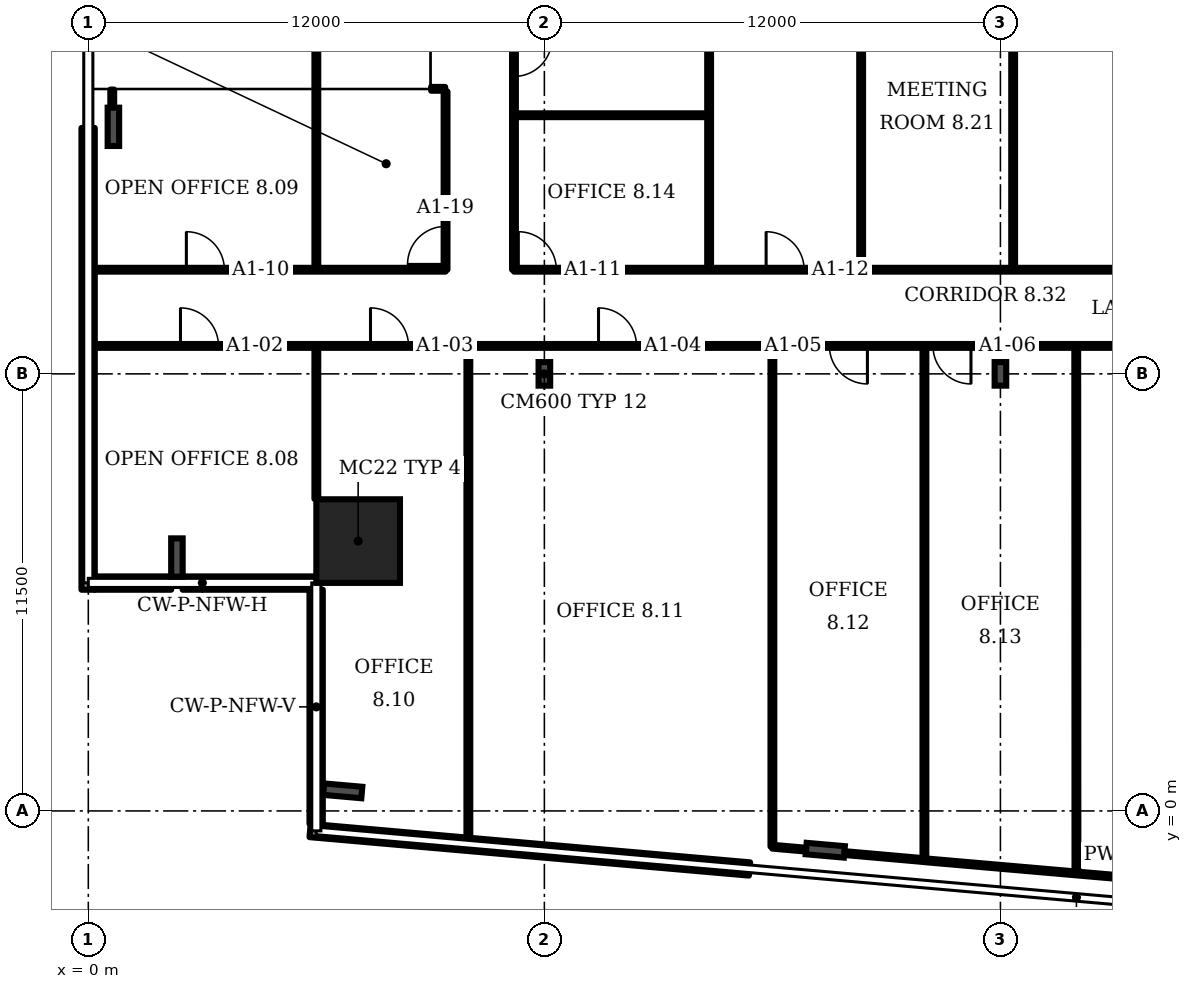
"""IFC4 building model, lengths in metres.
Left out: names, types, materials, properties, quantities, classifications, styles, units other than length and angle.
Written with IfcOpenShell. Run it as: python <this file> out.ifc"""

import sys

from ifc_helpers import new_model, si_unit, direction, frame, frame_2d, origin, origin_2d, place, context, subcontext, project, spatial, rectangle, i_section, extrude, element, fill, save


model = new_model("IFC4")
c1 = context("Model", 3, precision=1e-05, world=origin(), true_north=direction((0.0, 1.0)))
c2 = subcontext(c1, "Body", "Model", "MODEL_VIEW")
j1 = project(units=[si_unit("LENGTHUNIT", "METRE"), si_unit("PLANEANGLEUNIT", "RADIAN")], contexts=[c1])
p1 = place(None, origin())
s1 = spatial("IfcSite", under=j1, at=p1, CompositionType="ELEMENT")
p2 = place(p1, origin())
s2 = spatial("IfcBuilding", under=s1, at=p2, CompositionType="ELEMENT")
p3 = place(p2, frame((0.0, 0.0, 48.7)))
s3 = spatial("IfcBuildingStorey", under=s2, at=p3, CompositionType="ELEMENT", Elevation=48.7)
p4 = place(p3, frame((7.1, 7.1, 0.0), z_axis=(0.0, 0.0, 1.0), x_axis=(1.0, 0.0, 0.0)))
e1 = element("IfcColumn", 1, at=p4, inside=s3, PredefinedType="COLUMN", context=c2, shape_type="SweptSolid", body=[
    extrude(rectangle(XDim=2.2, YDim=2.2, at=origin_2d()), origin(), (0.0, 0.0, 1.0), 3.6),
])
for number, where, z_axis, x_axis in (
    (2, (6.694, 0.529, 0.0), (0.0, 0.0, 1.0), (-0.087, -0.996, 0.0)),
    (3, (19.391, -1.034, 0.0), (0.0, 0.0, 1.0), (-0.087, -0.996, 0.0)),
    (4, (0.66, 18.0, 0.0), (0.0, 0.0, 1.0), (-1.0, 0.0, 0.0)),
    (5, (2.332, 6.667, 0.0), (0.0, 0.0, 1.0), (-1.0, 0.0, 0.0)),
):
    element("IfcColumn", number, at=place(p3, frame(where, z_axis=z_axis, x_axis=x_axis)), inside=s3, PredefinedType="COLUMN", context=c2, shape_type="SweptSolid", body=[
        extrude(i_section(OverallWidth=0.302, OverallDepth=1.008, WebThickness=0.021, FlangeThickness=0.04, FilletRadius=0.03, at=origin_2d()), origin(), (0.0, 0.0, 1.0), 3.6),
    ])
for number, where, z_axis, x_axis in (
    (6, (12.0, 11.5, 0.0), (0.0, 0.0, 1.0), (1.0, 0.0, 0.0)),
    (7, (24.0, 11.5, 0.0), (0.0, 0.0, 1.0), (1.0, 0.0, 0.0)),
):
    element("IfcColumn", number, at=place(p3, frame(where, z_axis=z_axis, x_axis=x_axis)), inside=s3, PredefinedType="COLUMN", context=c2, shape_type="SweptSolid", body=[
        extrude(i_section(OverallWidth=0.305, OverallDepth=0.62, WebThickness=0.021, FlangeThickness=0.04, FilletRadius=0.027, at=origin_2d()), origin(), (0.0, 0.0, 1.0), 3.6),
    ])
p5 = place(p3, frame((5.835, -0.516, 0.0), z_axis=(0.0, 0.0, 1.0), x_axis=(0.996192, -0.087142, 0.0)))
e8 = element("IfcWall", 8, at=p5, inside=s3, PredefinedType="SOLIDWALL", context=c2, shape_type="SweptSolid", body=[
    extrude(rectangle(XDim=11.607, YDim=0.35, at=frame_2d((5.804, 0.0))), origin(), (0.0, 0.0, 1.0), 1.0),
])
p6 = place(p3, frame((-0.005, 17.97, 0.0), z_axis=(0.0, 0.0, 1.0), x_axis=(0.0, -1.0, 0.0)))
e9 = element("IfcWall", 9, at=p6, inside=s3, PredefinedType="SOLIDWALL", context=c2, shape_type="SweptSolid", body=[
    extrude(rectangle(XDim=12.15, YDim=0.35, at=frame_2d((6.075, 0.0))), origin(), (0.0, 0.0, 1.0), 1.0),
])
p7 = place(p3, frame((0.17, 5.995, 0.0), z_axis=(0.0, 0.0, 1.0), x_axis=(1.0, 0.0, 0.0)))
e10 = element("IfcWall", 10, at=p7, inside=s3, PredefinedType="SOLIDWALL", context=c2, shape_type="SweptSolid", body=[
    extrude(rectangle(XDim=2.011, YDim=0.35, at=frame_2d((1.005, 0.0))), origin(), (0.0, 0.0, 1.0), 1.0),
])
p8 = place(p3, frame((2.483, 5.995, 0.0), z_axis=(0.0, 0.0, 1.0), x_axis=(1.0, 0.0, 0.0)))
e11 = element("IfcWall", 11, at=p8, inside=s3, PredefinedType="SOLIDWALL", context=c2, shape_type="SweptSolid", body=[
    extrude(rectangle(XDim=3.517, YDim=0.35, at=frame_2d((1.759, 0.0))), origin(), (0.0, 0.0, 1.0), 1.0),
])
p9 = place(p3, frame((5.995, 5.82, 0.0), z_axis=(0.0, 0.0, 1.0), x_axis=(0.0, -1.0, 0.0)))
e12 = element("IfcWall", 12, at=p9, inside=s3, PredefinedType="SOLIDWALL", context=c2, shape_type="SweptSolid", body=[
    extrude(rectangle(XDim=6.161, YDim=0.35, at=frame_2d((3.081, 0.0))), origin(), (0.0, 0.0, 1.0), 1.0),
])
p10 = place(p3, frame((0.02, 12.235, 0.0), z_axis=(0.0, 0.0, 1.0), x_axis=(1.0, 0.0, 0.0)))
e13 = element("IfcWall", 13, at=p10, inside=s3, PredefinedType="PARTITIONING", context=c2, shape_type="SweptSolid", body=[
    extrude(rectangle(XDim=38.46, YDim=0.1, at=frame_2d((19.23, 0.0))), origin(), (0.0, 0.0, 1.0), 3.2),
])
p11 = place(p10, frame((2.405, 0.0, 0.0)))
e14 = element("IfcOpeningElement", 14, at=p11, cuts=e13, PredefinedType="OPENING", context=c2, shape_type="SweptSolid", body=[
    extrude(rectangle(XDim=1.0, YDim=2.1, at=frame_2d((0.5, 1.05))), frame((0.0, 0.06, 0.0), z_axis=(0.0, -1.0, 0.0), x_axis=(1.0, 0.0, 0.0)), (0.0, 0.0, 1.0), 0.12),
])
p12 = place(p10, frame((7.405, 0.0, 0.0)))
e15 = element("IfcOpeningElement", 15, at=p12, cuts=e13, PredefinedType="OPENING", context=c2, shape_type="SweptSolid", body=[
    extrude(rectangle(XDim=1.0, YDim=2.1, at=frame_2d((0.5, 1.05))), frame((0.0, 0.06, 0.0), z_axis=(0.0, -1.0, 0.0), x_axis=(1.0, 0.0, 0.0)), (0.0, 0.0, 1.0), 0.12),
])
p13 = place(p10, frame((13.405, 0.0, 0.0)))
e16 = element("IfcOpeningElement", 16, at=p13, cuts=e13, PredefinedType="OPENING", context=c2, shape_type="SweptSolid", body=[
    extrude(rectangle(XDim=1.0, YDim=2.1, at=frame_2d((0.5, 1.05))), frame((0.0, 0.06, 0.0), z_axis=(0.0, -1.0, 0.0), x_axis=(1.0, 0.0, 0.0)), (0.0, 0.0, 1.0), 0.12),
])
p14 = place(p10, frame((19.48, 0.0, 0.0)))
e17 = element("IfcOpeningElement", 17, at=p14, cuts=e13, PredefinedType="OPENING", context=c2, shape_type="SweptSolid", body=[
    extrude(rectangle(XDim=1.0, YDim=2.1, at=frame_2d((0.5, 1.05))), frame((0.0, 0.06, 0.0), z_axis=(0.0, -1.0, 0.0), x_axis=(1.0, 0.0, 0.0)), (0.0, 0.0, 1.0), 0.12),
])
p15 = place(p10, frame((22.205, 0.0, 0.0)))
e18 = element("IfcOpeningElement", 18, at=p15, cuts=e13, PredefinedType="OPENING", context=c2, shape_type="SweptSolid", body=[
    extrude(rectangle(XDim=1.0, YDim=2.1, at=frame_2d((0.5, 1.05))), frame((0.0, 0.06, 0.0), z_axis=(0.0, -1.0, 0.0), x_axis=(1.0, 0.0, 0.0)), (0.0, 0.0, 1.0), 0.12),
])
p16 = place(p10, frame((34.2, 0.0, 0.0)))
e19 = element("IfcOpeningElement", 19, at=p16, cuts=e13, PredefinedType="OPENING", context=c2, shape_type="SweptSolid", body=[
    extrude(rectangle(XDim=1.0, YDim=2.1, at=frame_2d((0.5, 1.05))), frame((0.0, 0.06, 0.0), z_axis=(0.0, -1.0, 0.0), x_axis=(1.0, 0.0, 0.0)), (0.0, 0.0, 1.0), 0.12),
])
p17 = place(p3, frame((0.02, 14.24, 0.0), z_axis=(0.0, 0.0, 1.0), x_axis=(1.0, 0.0, 0.0)))
e20 = element("IfcWall", 20, at=p17, inside=s3, PredefinedType="PARTITIONING", context=c2, shape_type="SweptSolid", body=[
    extrude(rectangle(XDim=9.38, YDim=0.1, at=frame_2d((4.69, 0.0))), origin(), (0.0, 0.0, 1.0), 3.2),
])
p18 = place(p17, frame((2.56, 0.0, 0.0)))
e21 = element("IfcOpeningElement", 21, at=p18, cuts=e20, PredefinedType="OPENING", context=c2, shape_type="SweptSolid", body=[
    extrude(rectangle(XDim=1.0, YDim=2.1, at=frame_2d((0.5, 1.05))), frame((0.0, 0.06, 0.0), z_axis=(0.0, -1.0, 0.0), x_axis=(1.0, 0.0, 0.0)), (0.0, 0.0, 1.0), 0.12),
])
p19 = place(p3, frame((0.63, 17.5, 0.0), z_axis=(0.0, 0.0, 1.0), x_axis=(0.0, 1.0, 0.0)))
e22 = element("IfcWall", 22, at=p19, inside=s3, PredefinedType="PARTITIONING", context=c2, shape_type="SweptSolid", body=[
    extrude(rectangle(XDim=1.48, YDim=0.1, at=frame_2d((0.74, 0.0))), origin(), (0.0, 0.0, 1.0), 2.58),
])
p20 = place(p3, frame((6.0, 8.21, 0.0), z_axis=(0.0, 0.0, 1.0), x_axis=(0.0, 1.0, 0.0)))
e23 = element("IfcWall", 23, at=p20, inside=s3, PredefinedType="PARTITIONING", context=c2, shape_type="SweptSolid", body=[
    extrude(rectangle(XDim=4.025, YDim=0.1, at=frame_2d((2.013, 0.0))), origin(), (0.0, 0.0, 1.0), 3.2),
])
p21 = place(p3, frame((6.0, 14.24, 0.0), z_axis=(0.0, 0.0, 1.0), x_axis=(0.0, 1.0, 0.0)))
e24 = element("IfcWall", 24, at=p21, inside=s3, PredefinedType="PARTITIONING", context=c2, shape_type="SweptSolid", body=[
    extrude(rectangle(XDim=6.085, YDim=0.1, at=frame_2d((3.042, 0.0))), origin(), (0.0, 0.0, 1.0), 3.2),
])
p22 = place(p3, frame((9.02, 19.0, 0.0), z_axis=(0.0, 0.0, 1.0), x_axis=(1.0, 0.0, 0.0)))
e25 = element("IfcWall", 25, at=p22, inside=s3, PredefinedType="PARTITIONING", context=c2, shape_type="SweptSolid", body=[
    extrude(rectangle(XDim=0.37, YDim=0.1, at=frame_2d((0.185, 0.0))), origin(), (0.0, 0.0, 1.0), 3.2),
])
p23 = place(p3, frame((9.4, 14.24, 0.0), z_axis=(0.0, 0.0, 1.0), x_axis=(0.0, 1.0, 0.0)))
e26 = element("IfcWall", 26, at=p23, inside=s3, PredefinedType="PARTITIONING", context=c2, shape_type="SweptSolid", body=[
    extrude(rectangle(XDim=4.69, YDim=0.1, at=frame_2d((2.345, 0.0))), origin(), (0.0, 0.0, 1.0), 3.2),
])
p24 = place(p23, frame((0.14, 0.0, 0.0)))
e27 = element("IfcOpeningElement", 27, at=p24, cuts=e26, PredefinedType="OPENING", context=c2, shape_type="SweptSolid", body=[
    extrude(rectangle(XDim=1.0, YDim=2.1, at=frame_2d((0.5, 1.05))), frame((0.0, 0.06, 0.0), z_axis=(0.0, -1.0, 0.0), x_axis=(1.0, 0.0, 0.0)), (0.0, 0.0, 1.0), 0.12),
])
p25 = place(p3, frame((10.0, -0.855, 0.0), z_axis=(0.0, 0.0, 1.0), x_axis=(0.0, 1.0, 0.0)))
e28 = element("IfcWall", 28, at=p25, inside=s3, PredefinedType="PARTITIONING", context=c2, shape_type="SweptSolid", body=[
    extrude(rectangle(XDim=13.09, YDim=0.1, at=frame_2d((6.545, 0.0))), origin(), (0.0, 0.0, 1.0), 3.2),
])
p26 = place(p3, frame((11.2, 14.24, 0.0), z_axis=(0.0, 0.0, 1.0), x_axis=(0.0, 1.0, 0.0)))
e29 = element("IfcWall", 29, at=p26, inside=s3, PredefinedType="PARTITIONING", context=c2, shape_type="SweptSolid", body=[
    extrude(rectangle(XDim=7.11, YDim=0.1, at=frame_2d((3.555, 0.0))), origin(), (0.0, 0.0, 1.0), 3.2),
])
p27 = place(p26, frame((5.085, 0.0, 0.0)))
e30 = element("IfcOpeningElement", 30, at=p27, cuts=e29, PredefinedType="OPENING", context=c2, shape_type="SweptSolid", body=[
    extrude(rectangle(XDim=1.0, YDim=2.1, at=frame_2d((0.5, 1.05))), frame((0.0, 0.06, 0.0), z_axis=(0.0, -1.0, 0.0), x_axis=(1.0, 0.0, 0.0)), (0.0, 0.0, 1.0), 0.12),
])
p28 = place(p3, frame((11.2, 14.24, 0.0), z_axis=(0.0, 0.0, 1.0), x_axis=(1.0, 0.0, 0.0)))
e31 = element("IfcWall", 31, at=p28, inside=s3, PredefinedType="PARTITIONING", context=c2, shape_type="SweptSolid", body=[
    extrude(rectangle(XDim=51.635, YDim=0.1, at=frame_2d((25.817, 0.0))), origin(), (0.0, 0.0, 1.0), 3.2),
])
p29 = place(p28, frame((0.115, 0.0, 0.0)))
e32 = element("IfcOpeningElement", 32, at=p29, cuts=e31, PredefinedType="OPENING", context=c2, shape_type="SweptSolid", body=[
    extrude(rectangle(XDim=1.0, YDim=2.1, at=frame_2d((0.5, 1.05))), frame((0.0, 0.06, 0.0), z_axis=(0.0, -1.0, 0.0), x_axis=(1.0, 0.0, 0.0)), (0.0, 0.0, 1.0), 0.12),
])
p30 = place(p28, frame((6.635, 0.0, 0.0)))
e33 = element("IfcOpeningElement", 33, at=p30, cuts=e31, PredefinedType="OPENING", context=c2, shape_type="SweptSolid", body=[
    extrude(rectangle(XDim=1.0, YDim=2.1, at=frame_2d((0.5, 1.05))), frame((0.0, 0.06, 0.0), z_axis=(0.0, -1.0, 0.0), x_axis=(1.0, 0.0, 0.0)), (0.0, 0.0, 1.0), 0.12),
])
p31 = place(p28, frame((22.7, 0.0, 0.0)))
e34 = element("IfcOpeningElement", 34, at=p31, cuts=e31, PredefinedType="OPENING", context=c2, shape_type="SweptSolid", body=[
    extrude(rectangle(XDim=1.0, YDim=2.1, at=frame_2d((0.5, 1.05))), frame((0.0, 0.06, 0.0), z_axis=(0.0, -1.0, 0.0), x_axis=(1.0, 0.0, 0.0)), (0.0, 0.0, 1.0), 0.12),
])
p32 = place(p28, frame((27.865, 0.0, 0.0)))
e35 = element("IfcOpeningElement", 35, at=p32, cuts=e31, PredefinedType="OPENING", context=c2, shape_type="SweptSolid", body=[
    extrude(rectangle(XDim=1.0, YDim=2.1, at=frame_2d((0.5, 1.05))), frame((0.0, 0.06, 0.0), z_axis=(0.0, -1.0, 0.0), x_axis=(1.0, 0.0, 0.0)), (0.0, 0.0, 1.0), 0.12),
])
p33 = place(p28, frame((34.065, 0.0, 0.0)))
e36 = element("IfcOpeningElement", 36, at=p33, cuts=e31, PredefinedType="OPENING", context=c2, shape_type="SweptSolid", body=[
    extrude(rectangle(XDim=1.8, YDim=2.1, at=frame_2d((0.9, 1.05))), frame((0.0, 0.06, 0.0), z_axis=(0.0, -1.0, 0.0), x_axis=(1.0, 0.0, 0.0)), (0.0, 0.0, 1.0), 0.12),
])
p34 = place(p28, frame((41.765, 0.0, 0.0)))
e37 = element("IfcOpeningElement", 37, at=p34, cuts=e31, PredefinedType="OPENING", context=c2, shape_type="SweptSolid", body=[
    extrude(rectangle(XDim=1.8, YDim=2.1, at=frame_2d((0.9, 1.05))), frame((0.0, 0.06, 0.0), z_axis=(0.0, -1.0, 0.0), x_axis=(1.0, 0.0, 0.0)), (0.0, 0.0, 1.0), 0.12),
])
p35 = place(p3, frame((11.2, 18.305, 0.0), z_axis=(0.0, 0.0, 1.0), x_axis=(1.0, 0.0, 0.0)))
e38 = element("IfcWall", 38, at=p35, inside=s3, PredefinedType="PARTITIONING", context=c2, shape_type="SweptSolid", body=[
    extrude(rectangle(XDim=5.135, YDim=0.1, at=frame_2d((2.567, 0.0))), origin(), (0.0, 0.0, 1.0), 3.2),
])
p36 = place(p3, frame((16.335, 14.24, 0.0), z_axis=(0.0, 0.0, 1.0), x_axis=(0.0, 1.0, 0.0)))
e39 = element("IfcWall", 39, at=p36, inside=s3, PredefinedType="PARTITIONING", context=c2, shape_type="SweptSolid", body=[
    extrude(rectangle(XDim=16.26, YDim=0.1, at=frame_2d((8.13, 0.0))), origin(), (0.0, 0.0, 1.0), 3.2),
])
p37 = place(p3, frame((18.0, -0.94, 0.0), z_axis=(0.0, 0.0, 1.0), x_axis=(0.0, 1.0, 0.0)))
e40 = element("IfcWall", 40, at=p37, inside=s3, PredefinedType="PARTITIONING", context=c2, shape_type="SweptSolid", body=[
    extrude(rectangle(XDim=13.175, YDim=0.1, at=frame_2d((6.587, 0.0))), origin(), (0.0, 0.0, 1.0), 3.2),
])
p38 = place(p3, frame((20.335, 14.24, 0.0), z_axis=(0.0, 0.0, 1.0), x_axis=(0.0, 1.0, 0.0)))
e41 = element("IfcWall", 41, at=p38, inside=s3, PredefinedType="PARTITIONING", context=c2, shape_type="SweptSolid", body=[
    extrude(rectangle(XDim=16.26, YDim=0.1, at=frame_2d((8.13, 0.0))), origin(), (0.0, 0.0, 1.0), 3.2),
])
p39 = place(p3, frame((22.0, -1.295, 0.0), z_axis=(0.0, 0.0, 1.0), x_axis=(-0.99611, 0.088069, 0.0)))
e42 = element("IfcWall", 42, at=p39, inside=s3, PredefinedType="PARTITIONING", context=c2, shape_type="SweptSolid", body=[
    extrude(rectangle(XDim=4.017, YDim=0.1, at=frame_2d((2.008, 0.0))), origin(), (0.0, 0.0, 1.0), 2.58),
])
p40 = place(p3, frame((22.0, -1.295, 0.0), z_axis=(0.0, 0.0, 1.0), x_axis=(0.0, 1.0, 0.0)))
e43 = element("IfcWall", 43, at=p40, inside=s3, PredefinedType="PARTITIONING", context=c2, shape_type="SweptSolid", body=[
    extrude(rectangle(XDim=13.53, YDim=0.1, at=frame_2d((6.765, 0.0))), origin(), (0.0, 0.0, 1.0), 3.2),
])
p41 = place(p3, frame((24.335, 14.24, 0.0), z_axis=(0.0, 0.0, 1.0), x_axis=(0.0, 1.0, 0.0)))
e44 = element("IfcWall", 44, at=p41, inside=s3, PredefinedType="PARTITIONING", context=c2, shape_type="SweptSolid", body=[
    extrude(rectangle(XDim=16.25, YDim=0.1, at=frame_2d((8.125, 0.0))), origin(), (0.0, 0.0, 1.0), 3.2),
])
p42 = place(p3, frame((26.0, -1.645, 0.0), z_axis=(0.0, 0.0, 1.0), x_axis=(-0.000352, 1.000004, 0.0)))
e45 = element("IfcWall", 45, at=p42, inside=s3, PredefinedType="PARTITIONING", context=c2, shape_type="SweptSolid", body=[
    extrude(rectangle(XDim=13.88, YDim=0.1, at=frame_2d((6.94, 0.0))), origin(), (0.0, 0.0, 1.0), 3.2),
])
p43 = place(p3, frame((32.665, -2.225, 0.0), z_axis=(0.0, 0.0, 1.0), x_axis=(-0.99623, 0.086702, 0.0)))
e46 = element("IfcWall", 46, at=p43, inside=s3, PredefinedType="PARTITIONING", context=c2, shape_type="SweptSolid", body=[
    extrude(rectangle(XDim=10.706, YDim=0.1, at=frame_2d((5.353, 0.0))), origin(), (0.0, 0.0, 1.0), 2.58),
])
p44 = place(p11, origin())
e47 = element("IfcDoor", 47, at=p44, inside=s3, OperationType="SINGLE_SWING_LEFT", PredefinedType="DOOR", context=c2, shape_type="SweptSolid", body=[
    extrude(rectangle(XDim=1.0, YDim=2.1, at=frame_2d((0.5, 1.05))), frame((0.0, 0.025, 0.0), z_axis=(0.0, -1.0, 0.0), x_axis=(1.0, 0.0, 0.0)), (0.0, 0.0, 1.0), 0.05),
])
fill(e14, e47)
p45 = place(p12, origin())
e48 = element("IfcDoor", 48, at=p45, inside=s3, OperationType="SINGLE_SWING_LEFT", PredefinedType="DOOR", context=c2, shape_type="SweptSolid", body=[
    extrude(rectangle(XDim=1.0, YDim=2.1, at=frame_2d((0.5, 1.05))), frame((0.0, 0.025, 0.0), z_axis=(0.0, -1.0, 0.0), x_axis=(1.0, 0.0, 0.0)), (0.0, 0.0, 1.0), 0.05),
])
fill(e15, e48)
p46 = place(p13, origin())
e49 = element("IfcDoor", 49, at=p46, inside=s3, OperationType="SINGLE_SWING_LEFT", PredefinedType="DOOR", context=c2, shape_type="SweptSolid", body=[
    extrude(rectangle(XDim=1.0, YDim=2.1, at=frame_2d((0.5, 1.05))), frame((0.0, 0.025, 0.0), z_axis=(0.0, -1.0, 0.0), x_axis=(1.0, 0.0, 0.0)), (0.0, 0.0, 1.0), 0.05),
])
fill(e16, e49)
p47 = place(p14, origin())
e50 = element("IfcDoor", 50, at=p47, inside=s3, OperationType="SINGLE_SWING_RIGHT", PredefinedType="DOOR", context=c2, shape_type="SweptSolid", body=[
    extrude(rectangle(XDim=1.0, YDim=2.1, at=frame_2d((0.5, 1.05))), frame((0.0, 0.025, 0.0), z_axis=(0.0, -1.0, 0.0), x_axis=(1.0, 0.0, 0.0)), (0.0, 0.0, 1.0), 0.05),
])
fill(e17, e50)
p48 = place(p15, origin())
e51 = element("IfcDoor", 51, at=p48, inside=s3, OperationType="SINGLE_SWING_RIGHT", PredefinedType="DOOR", context=c2, shape_type="SweptSolid", body=[
    extrude(rectangle(XDim=1.0, YDim=2.1, at=frame_2d((0.5, 1.05))), frame((0.0, 0.025, 0.0), z_axis=(0.0, -1.0, 0.0), x_axis=(1.0, 0.0, 0.0)), (0.0, 0.0, 1.0), 0.05),
])
fill(e18, e51)
p49 = place(p18, origin())
e52 = element("IfcDoor", 52, at=p49, inside=s3, OperationType="SINGLE_SWING_LEFT", PredefinedType="DOOR", context=c2, shape_type="SweptSolid", body=[
    extrude(rectangle(XDim=1.0, YDim=2.1, at=frame_2d((0.5, 1.05))), frame((0.0, 0.025, 0.0), z_axis=(0.0, -1.0, 0.0), x_axis=(1.0, 0.0, 0.0)), (0.0, 0.0, 1.0), 0.05),
])
fill(e21, e52)
p50 = place(p29, origin())
e53 = element("IfcDoor", 53, at=p50, inside=s3, OperationType="SINGLE_SWING_LEFT", PredefinedType="DOOR", context=c2, shape_type="SweptSolid", body=[
    extrude(rectangle(XDim=1.0, YDim=2.1, at=frame_2d((0.5, 1.05))), frame((0.0, 0.025, 0.0), z_axis=(0.0, -1.0, 0.0), x_axis=(1.0, 0.0, 0.0)), (0.0, 0.0, 1.0), 0.05),
])
fill(e32, e53)
p51 = place(p30, origin())
e54 = element("IfcDoor", 54, at=p51, inside=s3, OperationType="SINGLE_SWING_LEFT", PredefinedType="DOOR", context=c2, shape_type="SweptSolid", body=[
    extrude(rectangle(XDim=1.0, YDim=2.1, at=frame_2d((0.5, 1.05))), frame((0.0, 0.025, 0.0), z_axis=(0.0, -1.0, 0.0), x_axis=(1.0, 0.0, 0.0)), (0.0, 0.0, 1.0), 0.05),
])
fill(e33, e54)
p52 = place(p24, origin())
e55 = element("IfcDoor", 55, at=p52, inside=s3, OperationType="SINGLE_SWING_LEFT", PredefinedType="DOOR", context=c2, shape_type="SweptSolid", body=[
    extrude(rectangle(XDim=1.0, YDim=2.1, at=frame_2d((0.5, 1.05))), frame((0.0, 0.025, 0.0), z_axis=(0.0, -1.0, 0.0), x_axis=(1.0, 0.0, 0.0)), (0.0, 0.0, 1.0), 0.05),
])
fill(e27, e55)
p53 = place(p27, origin())
e56 = element("IfcDoor", 56, at=p53, inside=s3, OperationType="SINGLE_SWING_RIGHT", PredefinedType="DOOR", context=c2, shape_type="SweptSolid", body=[
    extrude(rectangle(XDim=1.0, YDim=2.1, at=frame_2d((0.5, 1.05))), frame((0.0, 0.025, 0.0), z_axis=(0.0, -1.0, 0.0), x_axis=(1.0, 0.0, 0.0)), (0.0, 0.0, 1.0), 0.05),
])
fill(e30, e56)
save(model, sys.argv[1])
